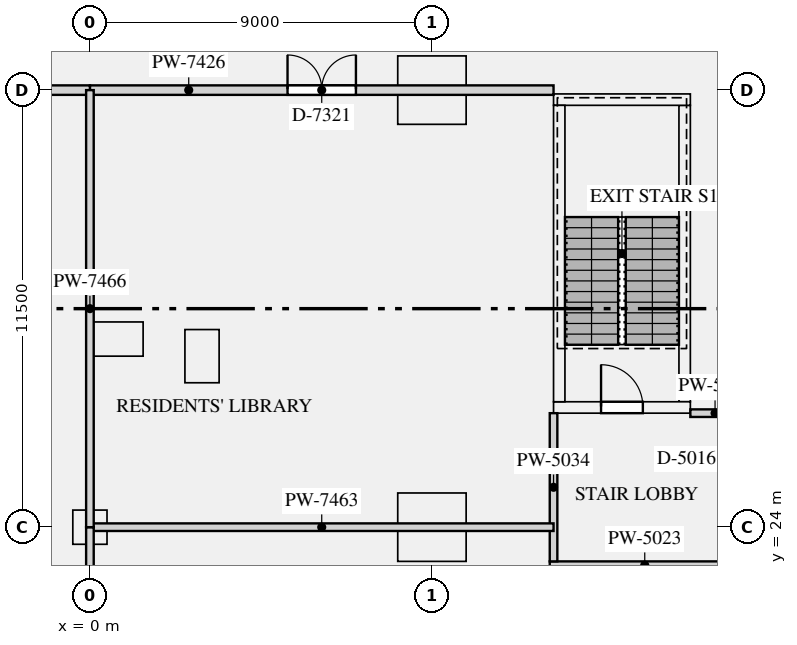
"""IFC4 building model, lengths in metres.
Left out: names, types, materials, properties, quantities, classifications, styles, units other than length and angle.
Written with IfcOpenShell. Run it as: python <this file> out.ifc"""

import sys

from ifc_helpers import new_model, si_unit, direction, frame, frame_2d, origin, origin_2d, place, context, subcontext, project, spatial, rectangle, extrude, element, fill, save


model = new_model("IFC4")
c1 = context("Model", 3, precision=1e-05, world=origin(), true_north=direction((0.0, 1.0)))
c2 = subcontext(c1, "Body", "Model", "MODEL_VIEW")
j1 = project(units=[si_unit("LENGTHUNIT", "METRE"), si_unit("PLANEANGLEUNIT", "RADIAN")], contexts=[c1])
p1 = place(None, origin())
s1 = spatial("IfcSite", under=j1, at=p1, CompositionType="ELEMENT")
p2 = place(p1, origin())
s2 = spatial("IfcBuilding", under=s1, at=p2, CompositionType="ELEMENT")
p3 = place(p2, frame((0.0, 0.0, 6.5)))
s3 = spatial("IfcBuildingStorey", under=s2, at=p3, CompositionType="ELEMENT", Elevation=6.5)
for number, where, z_axis, x_axis in (
    (1, (0.7, 28.95, 0.0), (0.0, 0.0, 1.0), (1.0, 0.0, 0.0)),
    (2, (2.95, 28.5, 0.0), (0.0, 0.0, 1.0), (0.0, -1.0, 0.0)),
):
    element("IfcColumn", number, at=place(p3, frame(where, z_axis=z_axis, x_axis=x_axis)), inside=s3, PredefinedType="USERDEFINED", context=c2, shape_type="SweptSolid", body=[
        extrude(rectangle(XDim=1.4, YDim=0.9, at=origin_2d()), origin(), (0.0, 0.0, 1.0), 4.5),
    ])
p4 = place(p3, frame((0.0, 24.0, 0.0), z_axis=(0.0, 0.0, 1.0), x_axis=(1.0, 0.0, 0.0)))
e3 = element("IfcColumn", 3, at=p4, inside=s3, PredefinedType="COLUMN", context=c2, shape_type="SweptSolid", body=[
    extrude(rectangle(XDim=0.9, YDim=0.9, at=origin_2d()), origin(), (0.0, 0.0, 1.0), 4.5),
])
for number, where, z_axis, x_axis in (
    (4, (9.0, 24.0, 0.0), (0.0, 0.0, 1.0), (1.0, 0.0, 0.0)),
    (5, (9.0, 35.5, 0.0), (0.0, 0.0, 1.0), (1.0, 0.0, 0.0)),
):
    element("IfcColumn", number, at=place(p3, frame(where, z_axis=z_axis, x_axis=x_axis)), inside=s3, PredefinedType="COLUMN", context=c2, shape_type="SweptSolid", body=[
        extrude(rectangle(XDim=1.8, YDim=1.8, at=origin_2d()), origin(), (0.0, 0.0, 1.0), 4.5),
    ])
p5 = place(p3, frame((12.2, 27.15, 0.0), z_axis=(0.0, 0.0, 1.0), x_axis=(1.0, 0.0, 0.0)))
e6 = element("IfcWall", 6, at=p5, inside=s3, PredefinedType="SHEAR", context=c2, shape_type="SweptSolid", body=[
    extrude(rectangle(XDim=3.6, YDim=0.3, at=frame_2d((1.8, 0.0))), origin(), (0.0, 0.0, 1.0), 4.5),
])
p6 = place(p5, frame((1.25, 0.0, 0.0)))
e7 = element("IfcOpeningElement", 7, at=p6, cuts=e6, PredefinedType="OPENING", context=c2, shape_type="SweptSolid", body=[
    extrude(rectangle(XDim=1.1, YDim=2.1, at=frame_2d((0.55, 1.05))), frame((0.0, 0.16, 0.0), z_axis=(0.0, -1.0, 0.0), x_axis=(1.0, 0.0, 0.0)), (0.0, 0.0, 1.0), 0.32),
])
p7 = place(p3, frame((12.2, 35.25, 0.0), z_axis=(0.0, 0.0, 1.0), x_axis=(1.0, 0.0, 0.0)))
e8 = element("IfcWall", 8, at=p7, inside=s3, PredefinedType="SHEAR", context=c2, shape_type="SweptSolid", body=[
    extrude(rectangle(XDim=3.6, YDim=0.3, at=frame_2d((1.8, 0.0))), origin(), (0.0, 0.0, 1.0), 4.5),
])
for number, where, z_axis, x_axis in (
    (9, (12.35, 27.3, 0.0), (0.0, 0.0, 1.0), (0.0, 1.0, 0.0)),
    (10, (15.65, 27.3, 0.0), (0.0, 0.0, 1.0), (0.0, 1.0, 0.0)),
):
    element("IfcWall", number, at=place(p3, frame(where, z_axis=z_axis, x_axis=x_axis)), inside=s3, PredefinedType="SHEAR", context=c2, shape_type="SweptSolid", body=[
        extrude(rectangle(XDim=7.8, YDim=0.3, at=frame_2d((3.9, 0.0))), origin(), (0.0, 0.0, 1.0), 4.5),
    ])
p8 = place(p3, frame((12.1, 23.0, 0.0), z_axis=(0.0, 0.0, 1.0), x_axis=(1.0, 0.0, 0.0)))
e11 = element("IfcWall", 11, at=p8, inside=s3, PredefinedType="PARTITIONING", context=c2, shape_type="SweptSolid", body=[
    extrude(rectangle(XDim=5.0, YDim=0.2, at=frame_2d((2.5, 0.0))), origin(), (0.0, 0.0, 1.0), 4.098),
])
p9 = place(p3, frame((15.8, 27.0, 0.0), z_axis=(0.0, 0.0, 1.0), x_axis=(1.0, 0.0, 0.0)))
e12 = element("IfcWall", 12, at=p9, inside=s3, PredefinedType="PARTITIONING", context=c2, shape_type="SweptSolid", body=[
    extrude(rectangle(XDim=1.3, YDim=0.2, at=frame_2d((0.65, 0.0))), origin(), (0.0, 0.0, 1.0), 4.098),
])
p10 = place(p3, frame((12.2, 23.1, 0.0), z_axis=(0.0, 0.0, 1.0), x_axis=(0.0, 1.0, 0.0)))
e13 = element("IfcWall", 13, at=p10, inside=s3, PredefinedType="PARTITIONING", context=c2, shape_type="SweptSolid", body=[
    extrude(rectangle(XDim=3.9, YDim=0.2, at=frame_2d((1.95, 0.0))), origin(), (0.0, 0.0, 1.0), 4.098),
])
p11 = place(p3, frame((0.0, 35.5, 0.0), z_axis=(0.0, 0.0, 1.0), x_axis=(1.0, 0.0, 0.0)))
e14 = element("IfcWall", 14, at=p11, inside=s3, PredefinedType="PARTITIONING", context=c2, shape_type="SweptSolid", body=[
    extrude(rectangle(XDim=12.2, YDim=0.25, at=frame_2d((6.1, 0.0))), origin(), (0.0, 0.0, 1.0), 4.098),
])
p12 = place(p11, frame((5.2, 0.0, 0.0)))
e15 = element("IfcOpeningElement", 15, at=p12, cuts=e14, PredefinedType="OPENING", context=c2, shape_type="SweptSolid", body=[
    extrude(rectangle(XDim=1.8, YDim=2.4, at=frame_2d((0.9, 1.2))), frame((0.0, 0.135, 0.0), z_axis=(0.0, -1.0, 0.0), x_axis=(1.0, 0.0, 0.0)), (0.0, 0.0, 1.0), 0.27),
])
p13 = place(p3, frame((-18.0, 35.5, 0.0), z_axis=(0.0, 0.0, 1.0), x_axis=(1.0, 0.0, 0.0)))
e16 = element("IfcWall", 16, at=p13, inside=s3, PredefinedType="PARTITIONING", context=c2, shape_type="SweptSolid", body=[
    extrude(rectangle(XDim=18.0, YDim=0.25, at=frame_2d((9.0, 0.0))), origin(), (0.0, 0.0, 1.0), 4.098),
])
p14 = place(p13, frame((6.3, 0.0, 0.0)))
e17 = element("IfcOpeningElement", 17, at=p14, cuts=e16, PredefinedType="OPENING", context=c2, shape_type="SweptSolid", body=[
    extrude(rectangle(XDim=1.8, YDim=2.4, at=frame_2d((0.9, 1.2))), frame((0.0, 0.135, 0.0), z_axis=(0.0, -1.0, 0.0), x_axis=(1.0, 0.0, 0.0)), (0.0, 0.0, 1.0), 0.27),
])
p15 = place(p3, frame((0.0, 24.0, 0.0), z_axis=(0.0, 0.0, 1.0), x_axis=(1.0, 0.0, 0.0)))
e18 = element("IfcWall", 18, at=p15, inside=s3, PredefinedType="PARTITIONING", context=c2, shape_type="SweptSolid", body=[
    extrude(rectangle(XDim=12.2, YDim=0.2, at=frame_2d((6.1, 0.0))), origin(), (0.0, 0.0, 1.0), 4.098),
])
p16 = place(p3, frame((0.0, 16.0, 0.0), z_axis=(0.0, 0.0, 1.0), x_axis=(0.0, 1.0, 0.0)))
e19 = element("IfcWall", 19, at=p16, inside=s3, PredefinedType="PARTITIONING", context=c2, shape_type="SweptSolid", body=[
    extrude(rectangle(XDim=8.0, YDim=0.2, at=frame_2d((4.0, 0.0))), origin(), (0.0, 0.0, 1.0), 4.098),
])
p17 = place(p3, frame((0.0, 24.0, 0.0), z_axis=(0.0, 0.0, 1.0), x_axis=(0.0, 1.0, 0.0)))
e20 = element("IfcWall", 20, at=p17, inside=s3, PredefinedType="PARTITIONING", context=c2, shape_type="SweptSolid", body=[
    extrude(rectangle(XDim=11.5, YDim=0.2, at=frame_2d((5.75, 0.0))), origin(), (0.0, 0.0, 1.0), 4.098),
])
p18 = place(p6, origin())
e21 = element("IfcDoor", 21, at=p18, inside=s3, OperationType="SINGLE_SWING_LEFT", PredefinedType="DOOR", context=c2, shape_type="SweptSolid", body=[
    extrude(rectangle(XDim=1.1, YDim=2.1, at=frame_2d((0.55, 1.05))), frame((0.0, 0.025, 0.0), z_axis=(0.0, -1.0, 0.0), x_axis=(1.0, 0.0, 0.0)), (0.0, 0.0, 1.0), 0.05),
])
fill(e7, e21)
p19 = place(p12, origin())
e22 = element("IfcDoor", 22, at=p19, inside=s3, OperationType="DOUBLE_DOOR_SINGLE_SWING", PredefinedType="DOOR", context=c2, shape_type="SweptSolid", body=[
    extrude(rectangle(XDim=1.8, YDim=2.4, at=frame_2d((0.9, 1.2))), frame((0.0, 0.025, 0.0), z_axis=(0.0, -1.0, 0.0), x_axis=(1.0, 0.0, 0.0)), (0.0, 0.0, 1.0), 0.05),
])
fill(e15, e22)
save(model, sys.argv[1])
